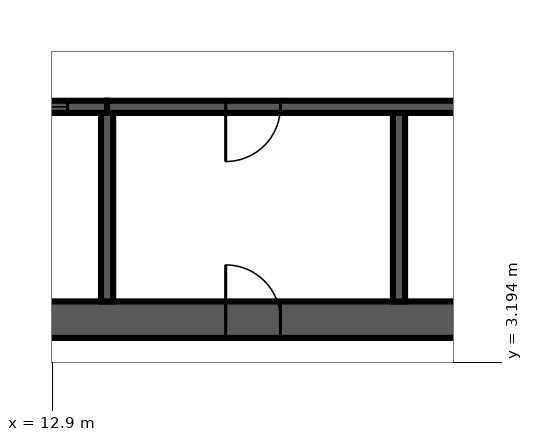
"""IFC4 building model, lengths in metres.
Left out: names, types, materials, properties, quantities, classifications, styles, units other than length and angle.
Written with IfcOpenShell. Run it as: python <this file> out.ifc"""

import sys

from ifc_helpers import new_model, si_unit, direction, frame, frame_2d, origin, place, context, subcontext, project, spatial, rectangle, extrude, source, transform, mapped, element, fill, save


model = new_model("IFC4")
c1 = context("Model", 3, precision=1e-05, world=origin(), true_north=direction((0.0, 1.0)))
c2 = subcontext(c1, "Body", "Model", "MODEL_VIEW")
j1 = project(units=[si_unit("LENGTHUNIT", "METRE"), si_unit("PLANEANGLEUNIT", "RADIAN")], contexts=[c1])
p1 = place(None, origin())
s1 = spatial("IfcSite", under=j1, at=p1, CompositionType="ELEMENT")
p2 = place(p1, origin())
s2 = spatial("IfcBuilding", under=s1, at=p2, CompositionType="ELEMENT")
p3 = place(p2, frame((0.0, 0.0, 284.5)))
s3 = spatial("IfcBuildingStorey", under=s2, at=p3, CompositionType="ELEMENT", Elevation=284.5)
m1 = source(origin(), c2, "Body", "SweptSolid", [
    extrude(rectangle(XDim=17.4, YDim=0.6, at=frame_2d((8.7, 0.0))), origin(), (0.0, 0.0, 1.0), 3.5),
])
p4 = place(p3, frame((4.2, 3.9, 0.0), z_axis=(0.0, 0.0, 1.0), x_axis=(1.0, 0.0, 0.0)))
e1 = element("IfcWall", 1, at=p4, inside=s3, PredefinedType="SHEAR", context=c2, shape_type="MappedRepresentation", body=[
    mapped(m1, transform((0.0, 0.0, 0.0), scale=1.0)),
])
p5 = place(p4, frame((11.55, 0.0, 0.0)))
e2 = element("IfcOpeningElement", 2, at=p5, cuts=e1, PredefinedType="OPENING", context=c2, shape_type="SweptSolid", body=[
    extrude(rectangle(XDim=0.9, YDim=2.1, at=frame_2d((0.45, 1.05))), frame((0.0, 0.31, 0.0), z_axis=(0.0, -1.0, 0.0), x_axis=(1.0, 0.0, 0.0)), (0.0, 0.0, 1.0), 0.62),
])
p6 = place(p3, frame((13.8, 4.2, 0.0), z_axis=(0.0, 0.0, 1.0), x_axis=(0.0, 1.0, 0.0)))
e3 = element("IfcWall", 3, at=p6, inside=s3, PredefinedType="SOLIDWALL", context=c2, shape_type="SweptSolid", body=[
    extrude(rectangle(XDim=3.1, YDim=0.2, at=frame_2d((1.55, 0.0))), origin(), (0.0, 0.0, 1.0), 3.1),
])
m2 = source(origin(), c2, "Body", "SweptSolid", [
    extrude(rectangle(XDim=3.1, YDim=0.2, at=frame_2d((1.55, 0.0))), origin(), (0.0, 0.0, 1.0), 3.1),
])
p7 = place(p3, frame((18.6, 4.2, 0.0), z_axis=(0.0, 0.0, 1.0), x_axis=(0.0, 1.0, 0.0)))
e4 = element("IfcWall", 4, at=p7, inside=s3, PredefinedType="SOLIDWALL", context=c2, shape_type="MappedRepresentation", body=[
    mapped(m2, transform((0.0, 0.0, 0.0), scale=1.0)),
])
p8 = place(p3, frame((4.2, 7.4, 0.0), z_axis=(0.0, 0.0, 1.0), x_axis=(1.0, 0.0, 0.0)))
e5 = element("IfcWall", 5, at=p8, inside=s3, PredefinedType="SOLIDWALL", context=c2, shape_type="SweptSolid", body=[
    extrude(rectangle(XDim=9.6, YDim=0.2, at=frame_2d((4.8, 0.0))), origin(), (0.0, 0.0, 1.0), 3.5),
])
m3 = source(origin(), c2, "Body", "SweptSolid", [
    extrude(rectangle(XDim=1.1, YDim=2.1, at=frame_2d((0.55, 1.05))), frame((0.0, 0.11, 0.0), z_axis=(0.0, -1.0, 0.0), x_axis=(1.0, 0.0, 0.0)), (0.0, 0.0, 1.0), 0.22),
])
p9 = place(p8, frame((0.65, 0.0, 0.0)))
e6 = element("IfcOpeningElement", 6, at=p9, cuts=e5, PredefinedType="OPENING", context=c2, shape_type="MappedRepresentation", body=[
    mapped(m3, transform((0.0, 0.0, 0.0), scale=1.0)),
])
p10 = place(p8, frame((3.05, 0.0, 0.0)))
e7 = element("IfcOpeningElement", 7, at=p10, cuts=e5, PredefinedType="OPENING", context=c2, shape_type="MappedRepresentation", body=[
    mapped(m3, transform((0.0, 0.0, 0.0), scale=1.0)),
])
p11 = place(p8, frame((5.45, 0.0, 0.0)))
e8 = element("IfcOpeningElement", 8, at=p11, cuts=e5, PredefinedType="OPENING", context=c2, shape_type="MappedRepresentation", body=[
    mapped(m3, transform((0.0, 0.0, 0.0), scale=1.0)),
])
p12 = place(p8, frame((7.85, 0.0, 0.0)))
e9 = element("IfcOpeningElement", 9, at=p12, cuts=e5, PredefinedType="OPENING", context=c2, shape_type="MappedRepresentation", body=[
    mapped(m3, transform((0.0, 0.0, 0.0), scale=1.0)),
])
p13 = place(p3, frame((13.8, 7.4, 0.0), z_axis=(0.0, 0.0, 1.0), x_axis=(1.0, 0.0, 0.0)))
e10 = element("IfcWall", 10, at=p13, inside=s3, PredefinedType="SOLIDWALL", context=c2, shape_type="SweptSolid", body=[
    extrude(rectangle(XDim=7.2, YDim=0.2, at=frame_2d((3.6, 0.0))), origin(), (0.0, 0.0, 1.0), 3.1),
])
m4 = source(origin(), c2, "Body", "SweptSolid", [
    extrude(rectangle(XDim=0.9, YDim=2.1, at=frame_2d((0.45, 1.05))), frame((0.0, 0.11, 0.0), z_axis=(0.0, -1.0, 0.0), x_axis=(1.0, 0.0, 0.0)), (0.0, 0.0, 1.0), 0.22),
])
p14 = place(p13, frame((1.95, 0.0, 0.0)))
e11 = element("IfcOpeningElement", 11, at=p14, cuts=e10, PredefinedType="OPENING", context=c2, shape_type="MappedRepresentation", body=[
    mapped(m4, transform((0.0, 0.0, 0.0), scale=1.0)),
])
m5 = source(origin(), c2, "Body", "SweptSolid", [
    extrude(rectangle(XDim=1.1, YDim=2.1, at=frame_2d((0.55, 1.05))), frame((0.0, 0.025, 0.0), z_axis=(0.0, -1.0, 0.0), x_axis=(1.0, 0.0, 0.0)), (0.0, 0.0, 1.0), 0.05),
])
p15 = place(p12, origin())
e12 = element("IfcDoor", 12, at=p15, inside=s3, OperationType="SLIDING_TO_LEFT", PredefinedType="DOOR", context=c2, shape_type="MappedRepresentation", body=[
    mapped(m5, transform((0.0, 0.0, 0.0), scale=1.0)),
])
fill(e9, e12)
m6 = source(origin(), c2, "Body", "SweptSolid", [
    extrude(rectangle(XDim=0.9, YDim=2.1, at=frame_2d((0.45, 1.05))), frame((0.0, 0.025, 0.0), z_axis=(0.0, -1.0, 0.0), x_axis=(1.0, 0.0, 0.0)), (0.0, 0.0, 1.0), 0.05),
])
p16 = place(p14, origin())
e13 = element("IfcDoor", 13, at=p16, inside=s3, OperationType="SINGLE_SWING_RIGHT", PredefinedType="DOOR", context=c2, shape_type="MappedRepresentation", body=[
    mapped(m6, transform((0.0, 0.0, 0.0), scale=1.0)),
])
fill(e11, e13)
p17 = place(p5, origin())
e14 = element("IfcDoor", 14, at=p17, inside=s3, OperationType="SINGLE_SWING_LEFT", PredefinedType="DOOR", context=c2, shape_type="MappedRepresentation", body=[
    mapped(m6, transform((0.0, 0.0, 0.0), scale=1.0)),
])
fill(e2, e14)
save(model, sys.argv[1])
